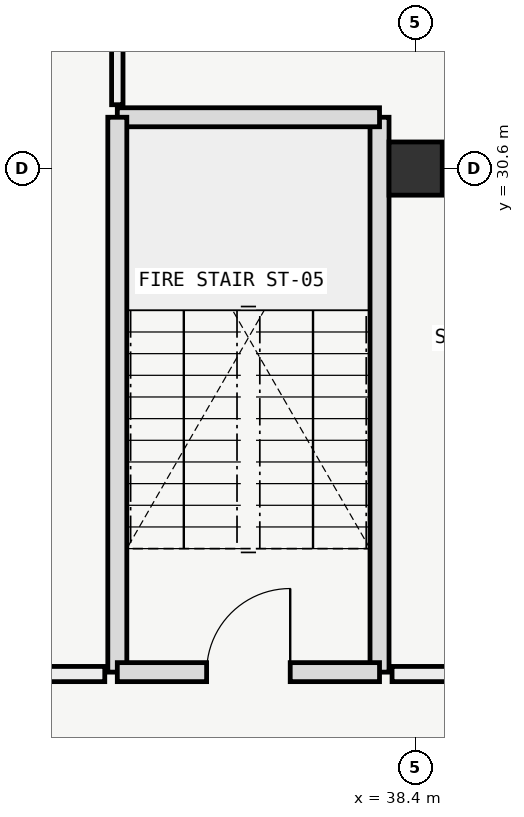
"""IFC4 building model, lengths in metres.
Left out: names, types, materials, properties, quantities, classifications, styles, units other than length and angle.
Written with IfcOpenShell. Run it as: python <this file> out.ifc"""

import sys

from ifc_helpers import new_model, si_unit, direction, frame, frame_2d, origin, origin_2d, place, context, subcontext, project, spatial, rectangle, extrude, element, fill, save


model = new_model("IFC4")
c1 = context("Model", 3, precision=1e-05, world=origin(), true_north=direction((0.0, 1.0)))
c2 = subcontext(c1, "Body", "Model", "MODEL_VIEW")
j1 = project(units=[si_unit("LENGTHUNIT", "METRE"), si_unit("PLANEANGLEUNIT", "RADIAN")], contexts=[c1])
p1 = place(None, origin())
s1 = spatial("IfcSite", under=j1, at=p1, CompositionType="ELEMENT")
p2 = place(p1, origin())
s2 = spatial("IfcBuilding", under=s1, at=p2, CompositionType="ELEMENT")
p3 = place(p2, frame((0.0, 0.0, 9.6)))
s3 = spatial("IfcBuildingStorey", under=s2, at=p3, CompositionType="ELEMENT", Elevation=9.6)
p4 = place(p3, frame((38.4, 30.6, 0.0), z_axis=(0.0, 0.0, 1.0), x_axis=(1.0, 0.0, 0.0)))
e1 = element("IfcColumn", 1, at=p4, inside=s3, PredefinedType="COLUMN", context=c2, shape_type="SweptSolid", body=[
    extrude(rectangle(XDim=0.7, YDim=0.7, at=origin_2d()), origin(), (0.0, 0.0, 1.0), 4.2),
])
p5 = place(p3, frame((37.925, 23.975, 0.0), z_axis=(0.0, 0.0, 1.0), x_axis=(0.0, 1.0, 0.0)))
e2 = element("IfcWall", 2, at=p5, inside=s3, PredefinedType="SOLIDWALL", context=c2, shape_type="SweptSolid", body=[
    extrude(rectangle(XDim=7.3, YDim=0.25, at=frame_2d((3.65, 0.0))), origin(), (0.0, 0.0, 1.0), 3.95),
])
p6 = place(p3, frame((37.925, 31.275, 0.0), z_axis=(0.0, 0.0, 1.0), x_axis=(-1.0, 0.0, 0.0)))
e3 = element("IfcWall", 3, at=p6, inside=s3, PredefinedType="SOLIDWALL", context=c2, shape_type="SweptSolid", body=[
    extrude(rectangle(XDim=3.45, YDim=0.25, at=frame_2d((1.725, 0.0))), origin(), (0.0, 0.0, 1.0), 3.95),
])
p7 = place(p3, frame((34.475, 31.275, 0.0), z_axis=(0.0, 0.0, 1.0), x_axis=(0.0, -1.0, 0.0)))
e4 = element("IfcWall", 4, at=p7, inside=s3, PredefinedType="SOLIDWALL", context=c2, shape_type="SweptSolid", body=[
    extrude(rectangle(XDim=7.3, YDim=0.25, at=frame_2d((3.65, 0.0))), origin(), (0.0, 0.0, 1.0), 3.95),
])
p8 = place(p3, frame((34.475, 23.975, 0.0), z_axis=(0.0, 0.0, 1.0), x_axis=(1.0, 0.0, 0.0)))
e5 = element("IfcWall", 5, at=p8, inside=s3, PredefinedType="SOLIDWALL", context=c2, shape_type="SweptSolid", body=[
    extrude(rectangle(XDim=3.45, YDim=0.25, at=frame_2d((1.725, 0.0))), origin(), (0.0, 0.0, 1.0), 3.95),
])
p9 = place(p8, frame((1.175, 0.0, 0.0)))
e6 = element("IfcOpeningElement", 6, at=p9, cuts=e5, PredefinedType="OPENING", context=c2, shape_type="SweptSolid", body=[
    extrude(rectangle(XDim=1.1, YDim=2.2, at=frame_2d((0.55, 1.1))), frame((0.0, 0.135, 0.0), z_axis=(0.0, -1.0, 0.0), x_axis=(1.0, 0.0, 0.0)), (0.0, 0.0, 1.0), 0.27),
])
p10 = place(p3, frame((27.325, 23.95, 0.0), z_axis=(0.0, 0.0, 1.0), x_axis=(1.0, 0.0, 0.0)))
e7 = element("IfcWall", 7, at=p10, inside=s3, PredefinedType="PARTITIONING", context=c2, shape_type="SweptSolid", body=[
    extrude(rectangle(XDim=6.985, YDim=0.2, at=frame_2d((3.493, 0.0))), origin(), (0.0, 0.0, 1.0), 3.28),
])
p11 = place(p10, frame((4.1, 0.0, 0.0)))
e8 = element("IfcOpeningElement", 8, at=p11, cuts=e7, PredefinedType="OPENING", context=c2, shape_type="SweptSolid", body=[
    extrude(rectangle(XDim=1.5, YDim=2.2, at=frame_2d((0.75, 1.1))), frame((0.0, 0.11, 0.0), z_axis=(0.0, -1.0, 0.0), x_axis=(1.0, 0.0, 0.0)), (0.0, 0.0, 1.0), 0.22),
])
p12 = place(p3, frame((34.475, 31.44, 0.0), z_axis=(0.0, 0.0, 1.0), x_axis=(0.0, 1.0, 0.0)))
e9 = element("IfcWall", 9, at=p12, inside=s3, PredefinedType="PARTITIONING", context=c2, shape_type="SweptSolid", body=[
    extrude(rectangle(XDim=9.21, YDim=0.15, at=frame_2d((4.605, 0.0))), origin(), (0.0, 0.0, 1.0), 3.43),
])
p13 = place(p3, frame((38.09, 23.95, 0.0), z_axis=(0.0, 0.0, 1.0), x_axis=(1.0, 0.0, 0.0)))
e10 = element("IfcWall", 10, at=p13, inside=s3, PredefinedType="PARTITIONING", context=c2, shape_type="SweptSolid", body=[
    extrude(rectangle(XDim=9.76, YDim=0.2, at=frame_2d((4.88, 0.0))), origin(), (0.0, 0.0, 1.0), 3.28),
])
p14 = place(p13, frame((3.235, 0.0, 0.0)))
e11 = element("IfcOpeningElement", 11, at=p14, cuts=e10, PredefinedType="OPENING", context=c2, shape_type="SweptSolid", body=[
    extrude(rectangle(XDim=0.92, YDim=2.1, at=frame_2d((0.46, 1.05))), frame((0.0, 0.11, 0.0), z_axis=(0.0, -1.0, 0.0), x_axis=(1.0, 0.0, 0.0)), (0.0, 0.0, 1.0), 0.22),
])
p15 = place(p9, origin())
e12 = element("IfcDoor", 12, at=p15, inside=s3, OperationType="SINGLE_SWING_RIGHT", PredefinedType="DOOR", context=c2, shape_type="SweptSolid", body=[
    extrude(rectangle(XDim=1.1, YDim=2.2, at=frame_2d((0.55, 1.1))), frame((0.0, 0.025, 0.0), z_axis=(0.0, -1.0, 0.0), x_axis=(1.0, 0.0, 0.0)), (0.0, 0.0, 1.0), 0.05),
])
fill(e6, e12)
save(model, sys.argv[1])
